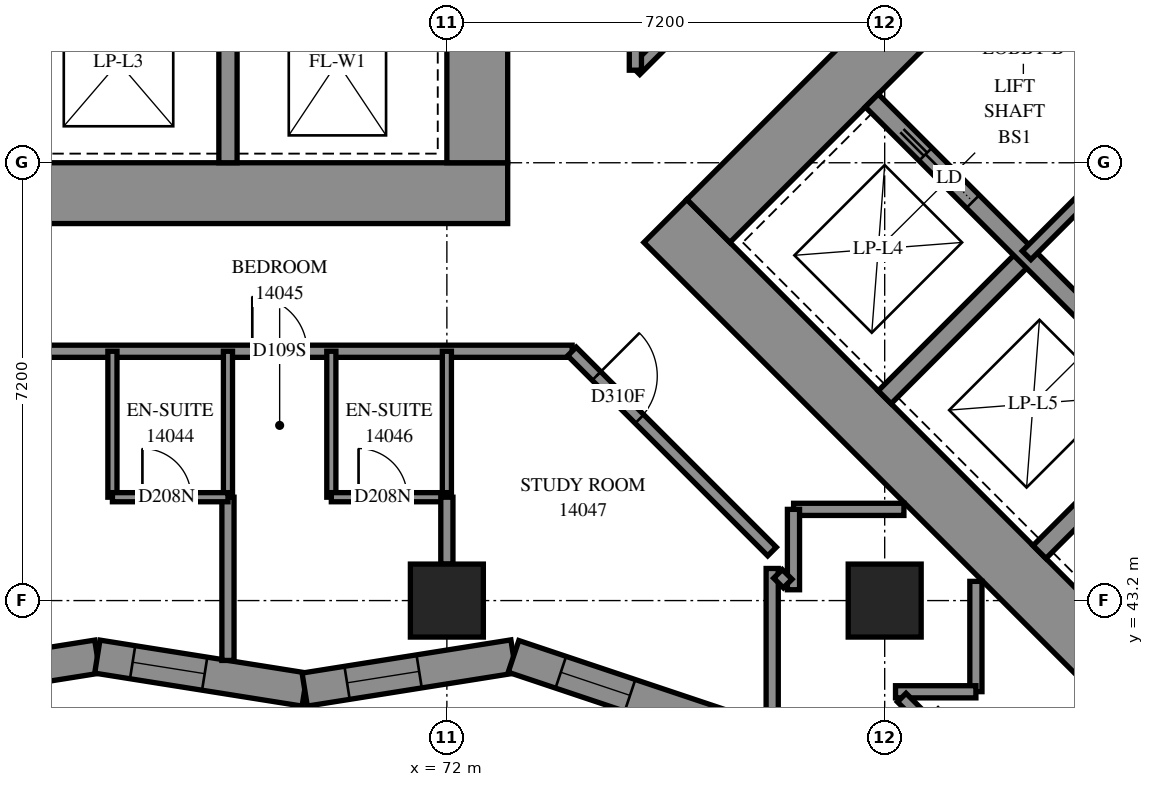
"""IFC4 building model, lengths in metres.
Left out: names, types, materials, properties, quantities, classifications, styles, units other than length and angle.
Written with IfcOpenShell. Run it as: python <this file> out.ifc"""

import sys

from ifc_helpers import new_model, si_unit, direction, frame, frame_2d, origin, origin_2d, place, context, subcontext, project, spatial, polyline, rectangle, outline, extrude, element, fill, save


model = new_model("IFC4")
c1 = context("Model", 3, precision=1e-05, world=origin(), true_north=direction((0.0, 1.0)))
c2 = subcontext(c1, "Body", "Model", "MODEL_VIEW")
j1 = project(units=[si_unit("LENGTHUNIT", "METRE"), si_unit("PLANEANGLEUNIT", "RADIAN")], contexts=[c1])
p1 = place(None, origin())
s1 = spatial("IfcSite", under=j1, at=p1, CompositionType="ELEMENT")
p2 = place(p1, origin())
s2 = spatial("IfcBuilding", under=s1, at=p2, CompositionType="ELEMENT")
p3 = place(p2, frame((0.0, 0.0, 54.2)))
s3 = spatial("IfcBuildingStorey", under=s2, at=p3, CompositionType="ELEMENT", Elevation=54.2)
for number, where, z_axis, x_axis in (
    (1, (72.0, 43.2, 0.0), (0.0, 0.0, 1.0), (1.0, 0.0, 0.0)),
    (2, (79.2, 43.2, 0.0), (0.0, 0.0, 1.0), (1.0, 0.0, 0.0)),
):
    element("IfcColumn", number, at=place(p3, frame(where, z_axis=z_axis, x_axis=x_axis)), inside=s3, PredefinedType="COLUMN", context=c2, shape_type="SweptSolid", body=[
        extrude(rectangle(XDim=1.2, YDim=1.2, at=origin_2d()), origin(), (0.0, 0.0, 1.0), 3.1),
    ])
p4 = place(p3, frame((56.6, 49.9, -0.3), z_axis=(0.0, 0.0, 1.0), x_axis=(1.0, 0.0, 0.0)))
e3 = element("IfcWall", 3, at=p4, inside=s3, PredefinedType="SHEAR", context=c2, shape_type="SweptSolid", body=[
    extrude(rectangle(XDim=16.4, YDim=1.0, at=frame_2d((8.2, 0.0))), origin(), (0.0, 0.0, 1.0), 2.7),
])
p5 = place(p3, frame((72.5, 50.4, -0.3), z_axis=(0.0, 0.0, 1.0), x_axis=(0.0, 1.0, 0.0)))
e4 = element("IfcWall", 4, at=p5, inside=s3, PredefinedType="SHEAR", context=c2, shape_type="SweptSolid", body=[
    extrude(rectangle(XDim=14.4, YDim=1.0, at=frame_2d((7.2, 0.0))), origin(), (0.0, 0.0, 1.0), 2.7),
])
p6 = place(p5, frame((4.55, 0.0, 0.3)))
e5 = element("IfcOpeningElement", 5, at=p6, cuts=e4, PredefinedType="OPENING", context=c2, shape_type="SweptSolid", body=[
    extrude(rectangle(XDim=1.1, YDim=2.1, at=frame_2d((0.55, 1.05))), frame((0.0, 0.51, 0.0), z_axis=(0.0, -1.0, 0.0), x_axis=(1.0, 0.0, 0.0)), (0.0, 0.0, 1.0), 1.02),
])
p7 = place(p5, frame((11.35, 0.0, 0.3)))
e6 = element("IfcOpeningElement", 6, at=p7, cuts=e4, PredefinedType="OPENING", context=c2, shape_type="SweptSolid", body=[
    extrude(rectangle(XDim=1.1, YDim=2.1, at=frame_2d((0.55, 1.05))), frame((0.0, 0.51, 0.0), z_axis=(0.0, -1.0, 0.0), x_axis=(1.0, 0.0, 0.0)), (0.0, 0.0, 1.0), 1.02),
])
p8 = place(p3, frame((68.4, 50.4, 0.0), z_axis=(0.0, 0.0, 1.0), x_axis=(0.0, 1.0, 0.0)))
e7 = element("IfcWall", 7, at=p8, inside=s3, PredefinedType="SOLIDWALL", context=c2, shape_type="SweptSolid", body=[
    extrude(rectangle(XDim=3.3, YDim=0.3, at=frame_2d((1.65, 0.0))), origin(), (0.0, 0.0, 1.0), 3.1),
])
p9 = place(p3, frame((75.594, 49.443, -0.3), z_axis=(0.0, 0.0, 1.0), x_axis=(0.7071037324, -0.70710983, 0.0)))
e8 = element("IfcWall", 8, at=p9, inside=s3, PredefinedType="SHEAR", context=c2, shape_type="SweptSolid", body=[
    extrude(rectangle(XDim=16.4, YDim=1.0, at=frame_2d((8.2, 0.0))), origin(), (0.0, 0.0, 1.0), 2.7),
])
p10 = place(p3, frame((76.301, 49.443, -0.3), z_axis=(0.0, 0.0, 1.0), x_axis=(0.7071067812, 0.7071067812, 0.0)))
e9 = element("IfcWall", 9, at=p10, inside=s3, PredefinedType="SHEAR", context=c2, shape_type="SweptSolid", body=[
    extrude(rectangle(XDim=14.4, YDim=1.0, at=frame_2d((7.2, 0.0))), origin(), (0.0, 0.0, 1.0), 2.7),
])
p11 = place(p10, frame((4.55, 0.0, 0.3)))
e10 = element("IfcOpeningElement", 10, at=p11, cuts=e9, PredefinedType="OPENING", context=c2, shape_type="SweptSolid", body=[
    extrude(rectangle(XDim=1.1, YDim=2.1, at=frame_2d((0.55, 1.05))), frame((0.0, 0.51, 0.0), z_axis=(0.0, -1.0, 0.0), x_axis=(1.0, 0.0, 0.0)), (0.0, 0.0, 1.0), 1.02),
])
p12 = place(p10, frame((11.35, 0.0, 0.3)))
e11 = element("IfcOpeningElement", 11, at=p12, cuts=e9, PredefinedType="OPENING", context=c2, shape_type="SweptSolid", body=[
    extrude(rectangle(XDim=1.1, YDim=2.1, at=frame_2d((0.55, 1.05))), frame((0.0, 0.51, 0.0), z_axis=(0.0, -1.0, 0.0), x_axis=(1.0, 0.0, 0.0)), (0.0, 0.0, 1.0), 1.02),
])
p13 = place(p3, frame((79.2, 46.544, 0.0), z_axis=(0.0, 0.0, 1.0), x_axis=(0.7071219326, 0.7070916295, 0.0)))
e12 = element("IfcWall", 12, at=p13, inside=s3, PredefinedType="SOLIDWALL", context=c2, shape_type="SweptSolid", body=[
    extrude(rectangle(XDim=3.3, YDim=0.3, at=frame_2d((1.65, 0.0))), origin(), (0.0, 0.0, 1.0), 3.1),
])
p14 = place(p3, frame((81.746, 43.999, 0.0), z_axis=(0.0, 0.0, 1.0), x_axis=(0.7071067812, 0.7071067812, 0.0)))
e13 = element("IfcWall", 13, at=p14, inside=s3, PredefinedType="SOLIDWALL", context=c2, shape_type="SweptSolid", body=[
    extrude(rectangle(XDim=3.3, YDim=0.3, at=frame_2d((1.65, 0.0))), origin(), (0.0, 0.0, 1.0), 3.1),
])
p15 = place(p3, frame((78.988, 51.423, 0.0), z_axis=(0.0, 0.0, 1.0), x_axis=(0.7071067812, -0.7071067812, 0.0)))
e14 = element("IfcWall", 14, at=p15, inside=s3, PredefinedType="SOLIDWALL", context=c2, shape_type="SweptSolid", body=[
    extrude(rectangle(XDim=14.4, YDim=0.3, at=frame_2d((7.2, 0.0))), origin(), (0.0, 0.0, 1.0), 3.1),
])
p16 = place(p15, frame((1.25, 0.0, 0.0)))
e15 = element("IfcOpeningElement", 15, at=p16, cuts=e14, PredefinedType="OPENING", context=c2, shape_type="SweptSolid", body=[
    extrude(rectangle(XDim=1.1, YDim=2.1, at=frame_2d((0.55, 1.05))), frame((0.0, 0.16, 0.0), z_axis=(0.0, -1.0, 0.0), x_axis=(1.0, 0.0, 0.0)), (0.0, 0.0, 1.0), 0.32),
])
p17 = place(p15, frame((4.85, 0.0, 0.0)))
e16 = element("IfcOpeningElement", 16, at=p17, cuts=e14, PredefinedType="OPENING", context=c2, shape_type="SweptSolid", body=[
    extrude(rectangle(XDim=1.1, YDim=2.1, at=frame_2d((0.55, 1.05))), frame((0.0, 0.16, 0.0), z_axis=(0.0, -1.0, 0.0), x_axis=(1.0, 0.0, 0.0)), (0.0, 0.0, 1.0), 0.32),
])
p18 = place(p15, frame((8.45, 0.0, 0.0)))
e17 = element("IfcOpeningElement", 17, at=p18, cuts=e14, PredefinedType="OPENING", context=c2, shape_type="SweptSolid", body=[
    extrude(rectangle(XDim=1.1, YDim=2.1, at=frame_2d((0.55, 1.05))), frame((0.0, 0.16, 0.0), z_axis=(0.0, -1.0, 0.0), x_axis=(1.0, 0.0, 0.0)), (0.0, 0.0, 1.0), 0.32),
])
p19 = place(p15, frame((12.05, 0.0, 0.0)))
e18 = element("IfcOpeningElement", 18, at=p19, cuts=e14, PredefinedType="OPENING", context=c2, shape_type="SweptSolid", body=[
    extrude(rectangle(XDim=1.1, YDim=2.1, at=frame_2d((0.55, 1.05))), frame((0.0, 0.16, 0.0), z_axis=(0.0, -1.0, 0.0), x_axis=(1.0, 0.0, 0.0)), (0.0, 0.0, 1.0), 0.32),
])
p20 = place(p3, frame((81.534, 53.969, 0.0), z_axis=(0.0, 0.0, 1.0), x_axis=(0.707103309, -0.7071102534, 0.0)))
e19 = element("IfcWall", 19, at=p20, inside=s3, PredefinedType="SOLIDWALL", context=c2, shape_type="SweptSolid", body=[
    extrude(rectangle(XDim=14.4, YDim=0.3, at=frame_2d((7.2, 0.0))), origin(), (0.0, 0.0, 1.0), 3.1),
])
p21 = place(p20, frame((12.05, 0.0, 0.0)))
e20 = element("IfcOpeningElement", 20, at=p21, cuts=e19, PredefinedType="OPENING", context=c2, shape_type="SweptSolid", body=[
    extrude(rectangle(XDim=1.1, YDim=2.1, at=frame_2d((0.55, 1.05))), frame((0.0, 0.16, 0.0), z_axis=(0.0, -1.0, 0.0), x_axis=(1.0, 0.0, 0.0)), (0.0, 0.0, 1.0), 0.32),
])
p22 = place(p3, frame((62.841, 41.736, 0.0), z_axis=(0.0, 0.0, 1.0), x_axis=(0.9876056196, 0.1569558544, 0.0)))
e21 = element("IfcWall", 21, at=p22, inside=s3, PredefinedType="SOLIDWALL", context=c2, shape_type="SweptSolid", body=[
    extrude(outline(polyline([(-0.044, -0.275), (3.409, -0.275), (3.497, 0.275), (0.044, 0.275), (-0.044, -0.275)])), origin(), (0.0, 0.0, 1.0), 3.1),
])
p23 = place(p22, frame((0.513, 0.0, 0.5)))
e22 = element("IfcOpeningElement", 22, at=p23, cuts=e21, PredefinedType="OPENING", context=c2, shape_type="SweptSolid", body=[
    extrude(rectangle(XDim=1.2, YDim=2.45, at=frame_2d((0.6, 1.225))), frame((0.0, 0.285, 0.0), z_axis=(0.0, -1.0, 0.0), x_axis=(1.0, 0.0, 0.0)), (0.0, 0.0, 1.0), 0.57),
])
p24 = place(p3, frame((66.252, 42.279, 0.0), z_axis=(0.0, 0.0, 1.0), x_axis=(0.9876056196, -0.1569558544, 0.0)))
e23 = element("IfcWall", 23, at=p24, inside=s3, PredefinedType="SOLIDWALL", context=c2, shape_type="SweptSolid", body=[
    extrude(outline(polyline([(0.044, -0.275), (3.497, -0.275), (3.409, 0.275), (-0.044, 0.275), (0.044, -0.275)])), origin(), (0.0, 0.0, 1.0), 3.1),
])
p25 = place(p24, frame((0.588, 0.0, 0.5)))
e24 = element("IfcOpeningElement", 24, at=p25, cuts=e23, PredefinedType="OPENING", context=c2, shape_type="SweptSolid", body=[
    extrude(rectangle(XDim=1.2, YDim=2.45, at=frame_2d((0.6, 1.225))), frame((0.0, 0.285, 0.0), z_axis=(0.0, -1.0, 0.0), x_axis=(1.0, 0.0, 0.0)), (0.0, 0.0, 1.0), 0.57),
])
p26 = place(p3, frame((69.662, 41.736, 0.0), z_axis=(0.0, 0.0, 1.0), x_axis=(0.9876057519, 0.1569550219, 0.0)))
e25 = element("IfcWall", 25, at=p26, inside=s3, PredefinedType="SOLIDWALL", context=c2, shape_type="SweptSolid", body=[
    extrude(outline(polyline([(-0.044, -0.275), (3.409, -0.275), (3.544, 0.275), (0.044, 0.275), (-0.044, -0.275)])), origin(), (0.0, 0.0, 1.0), 3.1),
])
p27 = place(p26, frame((0.705, 0.0, 0.5)))
e26 = element("IfcOpeningElement", 26, at=p27, cuts=e25, PredefinedType="OPENING", context=c2, shape_type="SweptSolid", body=[
    extrude(rectangle(XDim=1.2, YDim=2.45, at=frame_2d((0.6, 1.225))), frame((0.0, 0.285, 0.0), z_axis=(0.0, -1.0, 0.0), x_axis=(1.0, 0.0, 0.0)), (0.0, 0.0, 1.0), 0.57),
])
p28 = place(p3, frame((73.096, 42.282, 0.0), z_axis=(0.0, 0.0, 1.0), x_axis=(0.9482458518, -0.3175370917, 0.0)))
e27 = element("IfcWall", 27, at=p28, inside=s3, PredefinedType="SOLIDWALL", context=c2, shape_type="SweptSolid", body=[
    extrude(outline(polyline([(0.067, -0.275), (3.664, -0.275), (3.712, 0.275), (-0.067, 0.275), (0.067, -0.275)])), origin(), (0.0, 0.0, 1.0), 3.1),
])
p29 = place(p28, frame((0.82, 0.0, 0.5)))
e28 = element("IfcOpeningElement", 28, at=p29, cuts=e27, PredefinedType="OPENING", context=c2, shape_type="SweptSolid", body=[
    extrude(rectangle(XDim=1.2, YDim=2.45, at=frame_2d((0.6, 1.225))), frame((0.0, 0.285, 0.0), z_axis=(0.0, -1.0, 0.0), x_axis=(1.0, 0.0, 0.0)), (0.0, 0.0, 1.0), 0.57),
])
p30 = place(p3, frame((81.534, 48.878, 0.0), z_axis=(0.0, 0.0, 1.0), x_axis=(0.707092892, 0.7071206701, 0.0)))
e29 = element("IfcWall", 29, at=p30, inside=s3, PredefinedType="PARTITIONING", context=c2, shape_type="SweptSolid", body=[
    extrude(rectangle(XDim=3.6, YDim=0.2, at=frame_2d((1.8, 0.0))), origin(), (0.0, 0.0, 1.0), 3.1),
])
p31 = place(p3, frame((54.5, 47.3, 0.0), z_axis=(0.0, 0.0, 1.0), x_axis=(1.0, 0.0, 0.0)))
e30 = element("IfcWall", 30, at=p31, inside=s3, PredefinedType="PARTITIONING", context=c2, shape_type="SweptSolid", body=[
    extrude(rectangle(XDim=19.56, YDim=0.2, at=frame_2d((9.78, 0.0))), origin(), (0.0, 0.0, 1.0), 3.1),
])
p32 = place(p31, frame((0.23, 0.0, 0.0)))
e31 = element("IfcOpeningElement", 31, at=p32, cuts=e30, PredefinedType="OPENING", context=c2, shape_type="SweptSolid", body=[
    extrude(rectangle(XDim=1.0, YDim=2.1, at=frame_2d((0.5, 1.05))), frame((0.0, 0.11, 0.0), z_axis=(0.0, -1.0, 0.0), x_axis=(1.0, 0.0, 0.0)), (0.0, 0.0, 1.0), 0.22),
])
p33 = place(p31, frame((5.4, 0.0, 0.0)))
e32 = element("IfcOpeningElement", 32, at=p33, cuts=e30, PredefinedType="OPENING", context=c2, shape_type="SweptSolid", body=[
    extrude(rectangle(XDim=0.9, YDim=2.1, at=frame_2d((0.45, 1.05))), frame((0.0, 0.11, 0.0), z_axis=(0.0, -1.0, 0.0), x_axis=(1.0, 0.0, 0.0)), (0.0, 0.0, 1.0), 0.22),
])
p34 = place(p31, frame((9.001, 0.0, 0.0)))
e33 = element("IfcOpeningElement", 33, at=p34, cuts=e30, PredefinedType="OPENING", context=c2, shape_type="SweptSolid", body=[
    extrude(rectangle(XDim=0.9, YDim=2.1, at=frame_2d((0.45, 1.05))), frame((0.0, 0.11, 0.0), z_axis=(0.0, -1.0, 0.0), x_axis=(1.0, 0.0, 0.0)), (0.0, 0.0, 1.0), 0.22),
])
p35 = place(p31, frame((14.3, 0.0, 0.0)))
e34 = element("IfcOpeningElement", 34, at=p35, cuts=e30, PredefinedType="OPENING", context=c2, shape_type="SweptSolid", body=[
    extrude(rectangle(XDim=0.9, YDim=2.1, at=frame_2d((0.45, 1.05))), frame((0.0, 0.11, 0.0), z_axis=(0.0, -1.0, 0.0), x_axis=(1.0, 0.0, 0.0)), (0.0, 0.0, 1.0), 0.22),
])
p36 = place(p3, frame((74.057, 47.297, 0.0), z_axis=(0.0, 0.0, 1.0), x_axis=(0.7071067812, -0.7071067812, 0.0)))
e35 = element("IfcWall", 35, at=p36, inside=s3, PredefinedType="PARTITIONING", context=c2, shape_type="SweptSolid", body=[
    extrude(rectangle(XDim=4.653, YDim=0.2, at=frame_2d((2.326, 0.0))), origin(), (0.0, 0.0, 1.0), 3.1),
])
p37 = place(p36, frame((0.57, 0.0, 0.0)))
e36 = element("IfcOpeningElement", 36, at=p37, cuts=e35, PredefinedType="OPENING", context=c2, shape_type="SweptSolid", body=[
    extrude(rectangle(XDim=1.0, YDim=2.1, at=frame_2d((0.5, 1.05))), frame((0.0, 0.11, 0.0), z_axis=(0.0, -1.0, 0.0), x_axis=(1.0, 0.0, 0.0)), (0.0, 0.0, 1.0), 0.22),
])
p38 = place(p3, frame((77.35, 41.012, 0.0), z_axis=(0.0, 0.0, 1.0), x_axis=(0.0, 1.0, 0.0)))
e37 = element("IfcWall", 37, at=p38, inside=s3, PredefinedType="PARTITIONING", context=c2, shape_type="SweptSolid", body=[
    extrude(rectangle(XDim=2.716, YDim=0.2, at=frame_2d((1.358, 0.0))), origin(), (0.0, 0.0, 1.0), 3.1),
])
p39 = place(p3, frame((68.4, 42.215, 0.0), z_axis=(0.0, 0.0, 1.0), x_axis=(0.0, 1.0, 0.0)))
e38 = element("IfcWall", 38, at=p39, inside=s3, PredefinedType="PARTITIONING", context=c2, shape_type="SweptSolid", body=[
    extrude(rectangle(XDim=2.684, YDim=0.2, at=frame_2d((1.342, 0.0))), origin(), (0.0, 0.0, 1.0), 3.1),
])
for number, where, z_axis, x_axis in (
    (39, (66.5, 44.9, 0.0), (0.0, 0.0, 1.0), (0.0, 1.0, 0.0)),
    (40, (68.4, 44.9, 0.0), (0.0, 0.0, 1.0), (0.0, 1.0, 0.0)),
    (41, (70.1, 44.9, 0.0), (0.0, 0.0, 1.0), (0.0, 1.0, 0.0)),
    (42, (72.0, 44.9, 0.0), (0.0, 0.0, 1.0), (0.0, 1.0, 0.0)),
):
    element("IfcWall", number, at=place(p3, frame(where, z_axis=z_axis, x_axis=x_axis)), inside=s3, PredefinedType="PARTITIONING", context=c2, shape_type="SweptSolid", body=[
        extrude(rectangle(XDim=2.4, YDim=0.15, at=frame_2d((1.2, 0.0))), origin(), (0.0, 0.0, 1.0), 3.1),
    ])
p40 = place(p3, frame((66.5, 44.9, 0.0), z_axis=(0.0, 0.0, 1.0), x_axis=(1.0, 0.0, 0.0)))
e43 = element("IfcWall", 43, at=p40, inside=s3, PredefinedType="PARTITIONING", context=c2, shape_type="SweptSolid", body=[
    extrude(rectangle(XDim=1.9, YDim=0.15, at=frame_2d((0.95, 0.0))), origin(), (0.0, 0.0, 1.0), 3.1),
])
p41 = place(p40, frame((0.493, 0.0, 0.0)))
e44 = element("IfcOpeningElement", 44, at=p41, cuts=e43, PredefinedType="OPENING", context=c2, shape_type="SweptSolid", body=[
    extrude(rectangle(XDim=0.8, YDim=2.1, at=frame_2d((0.4, 1.05))), frame((0.0, 0.085, 0.0), z_axis=(0.0, -1.0, 0.0), x_axis=(1.0, 0.0, 0.0)), (0.0, 0.0, 1.0), 0.17),
])
p42 = place(p3, frame((70.1, 44.9, 0.0), z_axis=(0.0, 0.0, 1.0), x_axis=(1.0, 0.0, 0.0)))
e45 = element("IfcWall", 45, at=p42, inside=s3, PredefinedType="PARTITIONING", context=c2, shape_type="SweptSolid", body=[
    extrude(rectangle(XDim=1.9, YDim=0.15, at=frame_2d((0.95, 0.0))), origin(), (0.0, 0.0, 1.0), 3.1),
])
p43 = place(p42, frame((0.448, 0.0, 0.0)))
e46 = element("IfcOpeningElement", 46, at=p43, cuts=e45, PredefinedType="OPENING", context=c2, shape_type="SweptSolid", body=[
    extrude(rectangle(XDim=0.8, YDim=2.1, at=frame_2d((0.4, 1.05))), frame((0.0, 0.085, 0.0), z_axis=(0.0, -1.0, 0.0), x_axis=(1.0, 0.0, 0.0)), (0.0, 0.0, 1.0), 0.17),
])
for number, where, z_axis, x_axis in (
    (47, (77.702, 44.7, 0.0), (0.0, 0.0, 1.0), (1.0, 0.0, 0.0)),
    (48, (80.7, 41.702, 0.0), (0.0, 0.0, 1.0), (0.0, 1.0, 0.0)),
):
    element("IfcWall", number, at=place(p3, frame(where, z_axis=z_axis, x_axis=x_axis)), inside=s3, PredefinedType="PARTITIONING", context=c2, shape_type="SweptSolid", body=[
        extrude(rectangle(XDim=1.814, YDim=0.2, at=frame_2d((0.907, 0.0))), origin(), (0.0, 0.0, 1.0), 3.1),
    ])
p44 = place(p3, frame((75.102, 51.922, 0.0), z_axis=(0.0, 0.0, 1.0), x_axis=(0.7071067812, 0.7071067812, 0.0)))
e49 = element("IfcWall", 49, at=p44, inside=s3, PredefinedType="PARTITIONING", context=c2, shape_type="SweptSolid", body=[
    extrude(rectangle(XDim=1.663, YDim=0.2, at=frame_2d((0.832, 0.0))), origin(), (0.0, 0.0, 1.0), 3.1),
])
for number, where, z_axis, x_axis in (
    (50, (77.7, 43.378, 0.0), (0.0, 0.0, 1.0), (0.0, 1.0, 0.0)),
    (51, (79.378, 41.7, 0.0), (0.0, 0.0, 1.0), (1.0, 0.0, 0.0)),
):
    element("IfcWall", number, at=place(p3, frame(where, z_axis=z_axis, x_axis=x_axis)), inside=s3, PredefinedType="PARTITIONING", context=c2, shape_type="SweptSolid", body=[
        extrude(rectangle(XDim=1.322, YDim=0.2, at=frame_2d((0.661, 0.0))), origin(), (0.0, 0.0, 1.0), 3.1),
    ])
p45 = place(p3, frame((75.1, 51.922, 0.0), z_axis=(0.0, 0.0, 1.0), x_axis=(0.0, 1.0, 0.0)))
e52 = element("IfcWall", 52, at=p45, inside=s3, PredefinedType="PARTITIONING", context=c2, shape_type="SweptSolid", body=[
    extrude(rectangle(XDim=1.178, YDim=0.2, at=frame_2d((0.589, 0.0))), origin(), (0.0, 0.0, 1.0), 3.1),
])
p46 = place(p3, frame((72.0, 43.8, 0.0), z_axis=(0.0, 0.0, 1.0), x_axis=(0.0, 1.0, 0.0)))
e53 = element("IfcWall", 53, at=p46, inside=s3, PredefinedType="PARTITIONING", context=c2, shape_type="SweptSolid", body=[
    extrude(rectangle(XDim=1.1, YDim=0.2, at=frame_2d((0.55, 0.0))), origin(), (0.0, 0.0, 1.0), 3.1),
])
p47 = place(p3, frame((77.445, 43.64, 0.0), z_axis=(0.0, 0.0, 1.0), x_axis=(0.7071067812, -0.7071067812, 0.0)))
e54 = element("IfcWall", 54, at=p47, inside=s3, PredefinedType="PARTITIONING", context=c2, shape_type="SweptSolid", body=[
    extrude(rectangle(XDim=0.225, YDim=0.2, at=frame_2d((0.113, 0.0))), origin(), (0.0, 0.0, 1.0), 3.1),
])
p48 = place(p3, frame((79.481, 41.605, 0.0), z_axis=(0.0, 0.0, 1.0), x_axis=(0.7071067812, -0.7071067812, 0.0)))
e55 = element("IfcWall", 55, at=p48, inside=s3, PredefinedType="PARTITIONING", context=c2, shape_type="SweptSolid", body=[
    extrude(rectangle(XDim=0.355, YDim=0.2, at=frame_2d((0.177, 0.0))), origin(), (0.0, 0.0, 1.0), 3.1),
])
p49 = place(p25, origin())
e56 = element("IfcWindow", 56, at=p49, inside=s3, PartitioningType="SINGLE_PANEL", PredefinedType="WINDOW", context=c2, shape_type="SweptSolid", body=[
    extrude(rectangle(XDim=1.2, YDim=2.45, at=frame_2d((0.6, 1.225))), frame((0.0, 0.155, 0.0), z_axis=(0.0, -1.0, 0.0), x_axis=(1.0, 0.0, 0.0)), (0.0, 0.0, 1.0), 0.06),
])
fill(e24, e56)
p50 = place(p27, origin())
e57 = element("IfcWindow", 57, at=p50, inside=s3, PartitioningType="SINGLE_PANEL", PredefinedType="WINDOW", context=c2, shape_type="SweptSolid", body=[
    extrude(rectangle(XDim=1.2, YDim=2.45, at=frame_2d((0.6, 1.225))), frame((0.0, 0.155, 0.0), z_axis=(0.0, -1.0, 0.0), x_axis=(1.0, 0.0, 0.0)), (0.0, 0.0, 1.0), 0.06),
])
fill(e26, e57)
p51 = place(p29, origin())
e58 = element("IfcWindow", 58, at=p51, inside=s3, PartitioningType="SINGLE_PANEL", PredefinedType="WINDOW", context=c2, shape_type="SweptSolid", body=[
    extrude(rectangle(XDim=1.2, YDim=2.45, at=frame_2d((0.6, 1.225))), frame((0.0, 0.155, 0.0), z_axis=(0.0, -1.0, 0.0), x_axis=(1.0, 0.0, 0.0)), (0.0, 0.0, 1.0), 0.06),
])
fill(e28, e58)
p52 = place(p16, origin())
e59 = element("IfcDoor", 59, at=p52, inside=s3, OperationType="SLIDING_TO_LEFT", PredefinedType="DOOR", context=c2, shape_type="SweptSolid", body=[
    extrude(rectangle(XDim=1.1, YDim=2.1, at=frame_2d((0.55, 1.05))), frame((0.0, 0.025, 0.0), z_axis=(0.0, -1.0, 0.0), x_axis=(1.0, 0.0, 0.0)), (0.0, 0.0, 1.0), 0.05),
])
fill(e15, e59)
p53 = place(p41, origin())
e60 = element("IfcDoor", 60, at=p53, inside=s3, OperationType="SINGLE_SWING_RIGHT", PredefinedType="DOOR", context=c2, shape_type="SweptSolid", body=[
    extrude(rectangle(XDim=0.8, YDim=2.1, at=frame_2d((0.4, 1.05))), frame((0.0, 0.025, 0.0), z_axis=(0.0, -1.0, 0.0), x_axis=(1.0, 0.0, 0.0)), (0.0, 0.0, 1.0), 0.05),
])
fill(e44, e60)
p54 = place(p35, origin())
e61 = element("IfcDoor", 61, at=p54, inside=s3, OperationType="SINGLE_SWING_RIGHT", PredefinedType="DOOR", context=c2, shape_type="SweptSolid", body=[
    extrude(rectangle(XDim=0.9, YDim=2.1, at=frame_2d((0.45, 1.05))), frame((0.0, 0.025, 0.0), z_axis=(0.0, -1.0, 0.0), x_axis=(1.0, 0.0, 0.0)), (0.0, 0.0, 1.0), 0.05),
])
fill(e34, e61)
p55 = place(p43, origin())
e62 = element("IfcDoor", 62, at=p55, inside=s3, OperationType="SINGLE_SWING_RIGHT", PredefinedType="DOOR", context=c2, shape_type="SweptSolid", body=[
    extrude(rectangle(XDim=0.8, YDim=2.1, at=frame_2d((0.4, 1.05))), frame((0.0, 0.025, 0.0), z_axis=(0.0, -1.0, 0.0), x_axis=(1.0, 0.0, 0.0)), (0.0, 0.0, 1.0), 0.05),
])
fill(e46, e62)
p56 = place(p37, origin())
e63 = element("IfcDoor", 63, at=p56, inside=s3, OperationType="SINGLE_SWING_LEFT", PredefinedType="DOOR", context=c2, shape_type="SweptSolid", body=[
    extrude(rectangle(XDim=1.0, YDim=2.1, at=frame_2d((0.5, 1.05))), frame((0.0, 0.025, 0.0), z_axis=(0.0, -1.0, 0.0), x_axis=(1.0, 0.0, 0.0)), (0.0, 0.0, 1.0), 0.05),
])
fill(e36, e63)
save(model, sys.argv[1])
